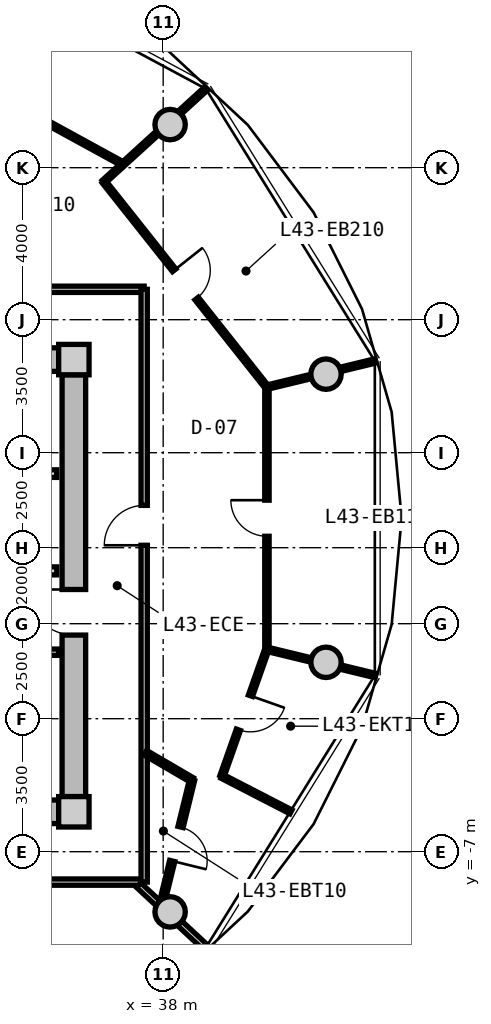
"""IFC4 building model, lengths in metres.
Left out: names, types, materials, properties, quantities, classifications, styles, units other than length and angle.
Written with IfcOpenShell. Run it as: python <this file> out.ifc"""

import sys

from ifc_helpers import new_model, si_unit, direction, frame, frame_2d, origin, origin_2d, place, context, subcontext, project, spatial, rectangle, circle, extrude, source, transform, mapped, element, fill, save


model = new_model("IFC4")
c1 = context("Model", 3, precision=1e-05, world=origin(), true_north=direction((0.0, 1.0)))
c2 = subcontext(c1, "Body", "Model", "MODEL_VIEW")
j1 = project(units=[si_unit("LENGTHUNIT", "METRE"), si_unit("PLANEANGLEUNIT", "RADIAN")], contexts=[c1])
p1 = place(None, origin())
s1 = spatial("IfcSite", under=j1, at=p1, CompositionType="ELEMENT")
p2 = place(p1, origin())
s2 = spatial("IfcBuilding", under=s1, at=p2, CompositionType="ELEMENT")
p3 = place(p2, frame((0.0, 0.0, 140.4)))
s3 = spatial("IfcBuildingStorey", under=s2, at=p3, CompositionType="ELEMENT", Elevation=140.4)
m1 = source(origin(), c2, "Body", "SweptSolid", [
    extrude(rectangle(XDim=0.8, YDim=0.8, at=origin_2d()), origin(), (0.0, 0.0, 1.0), 3.05),
])
for number, where, z_axis, x_axis in (
    (1, (35.65, -5.95, 0.0), (0.0, 0.0, 1.0), (1.0, 0.0, 0.0)),
    (2, (35.65, 5.95, 0.0), (0.0, 0.0, 1.0), (1.0, 0.0, 0.0)),
):
    element("IfcColumn", number, at=place(p3, frame(where, z_axis=z_axis, x_axis=x_axis)), inside=s3, PredefinedType="COLUMN", context=c2, shape_type="MappedRepresentation", body=[
        mapped(m1, transform((0.0, 0.0, 0.0), x_axis=(1.0, 0.0, 0.0), y_axis=(0.0, 1.0, 0.0), z_axis=(0.0, 0.0, 1.0), scale=1.0)),
    ])
m2 = source(origin(), c2, "Body", "SweptSolid", [
    extrude(rectangle(XDim=14.5, YDim=0.62, at=frame_2d((7.25, 0.0))), origin(), (0.0, 0.0, 1.0), 2.81),
])
for number, where, z_axis, x_axis in (
    (3, (20.75, 5.95, 0.0), (0.0, 0.0, 1.0), (1.0, 0.0, 0.0)),
    (4, (35.25, -5.95, 0.0), (0.0, 0.0, 1.0), (-1.0, 0.0, 0.0)),
):
    element("IfcWall", number, at=place(p3, frame(where, z_axis=z_axis, x_axis=x_axis)), inside=s3, PredefinedType="SHEAR", context=c2, shape_type="MappedRepresentation", body=[
        mapped(m2, transform((0.0, 0.0, 0.0), x_axis=(1.0, 0.0, 0.0), y_axis=(0.0, 1.0, 0.0), z_axis=(0.0, 0.0, 1.0), scale=1.0)),
    ])
m3 = source(origin(), c2, "Body", "SweptSolid", [
    extrude(rectangle(XDim=11.1, YDim=0.62, at=frame_2d((5.55, 0.0))), origin(), (0.0, 0.0, 1.0), 2.81),
])
p4 = place(p3, frame((35.65, 5.55, 0.0), z_axis=(0.0, 0.0, 1.0), x_axis=(0.0, -1.0, 0.0)))
e5 = element("IfcWall", 5, at=p4, inside=s3, PredefinedType="SHEAR", context=c2, shape_type="MappedRepresentation", body=[
    mapped(m3, transform((0.0, 0.0, 0.0), x_axis=(1.0, 0.0, 0.0), y_axis=(0.0, 1.0, 0.0), z_axis=(0.0, 0.0, 1.0), scale=1.0)),
])
p5 = place(p4, frame((5.65, 0.0, 0.0)))
e6 = element("IfcOpeningElement", 6, at=p5, cuts=e5, PredefinedType="OPENING", context=c2, shape_type="SweptSolid", body=[
    extrude(rectangle(XDim=1.2, YDim=2.15, at=frame_2d((0.6, 1.075))), frame((0.0, 0.32, 0.0), z_axis=(0.0, -1.0, 0.0), x_axis=(1.0, 0.0, 0.0)), (0.0, 0.0, 1.0), 0.64),
])
m4 = source(origin(), c2, "Body", "SweptSolid", [
    extrude(circle(Radius=0.4, at=origin_2d()), origin(), (0.0, 0.0, 1.0), 3.05),
])
for number, where, z_axis, x_axis in (
    (7, (42.285, 5.567, 0.0), (0.0, 0.0, 1.0), (1.0, 0.0, 0.0)),
    (8, (38.183, 12.135, 0.0), (0.0, 0.0, 1.0), (1.0, 0.0, 0.0)),
    (9, (38.183, -8.584, 0.0), (0.0, 0.0, 1.0), (1.0, 0.0, 0.0)),
    (10, (42.285, -2.016, 0.0), (0.0, 0.0, 1.0), (1.0, 0.0, 0.0)),
):
    element("IfcColumn", number, at=place(p3, frame(where, z_axis=z_axis, x_axis=x_axis)), inside=s3, PredefinedType="COLUMN", context=c2, shape_type="MappedRepresentation", body=[
        mapped(m4, transform((0.0, 0.0, 0.0), x_axis=(1.0, 0.0, 0.0), y_axis=(0.0, 1.0, 0.0), z_axis=(0.0, 0.0, 1.0), scale=1.0)),
    ])
m5 = source(origin(), c2, "Body", "SweptSolid", [
    extrude(rectangle(XDim=3.2, YDim=0.2, at=frame_2d((1.6, 0.0))), origin(), (0.0, 0.0, 1.0), 2.795),
])
p6 = place(p3, frame((32.0, 2.95, 0.0), z_axis=(0.0, 0.0, 1.0), x_axis=(1.0, 0.0, 0.0)))
e11 = element("IfcWall", 11, at=p6, inside=s3, PredefinedType="PARTITIONING", context=c2, shape_type="MappedRepresentation", body=[
    mapped(m5, transform((0.0, 0.0, 0.0), x_axis=(1.0, 0.0, 0.0), y_axis=(0.0, 1.0, 0.0), z_axis=(0.0, 0.0, 1.0), scale=1.0)),
])
m6 = source(origin(), c2, "Body", "SweptSolid", [
    extrude(rectangle(XDim=6.66, YDim=0.21, at=frame_2d((3.33, 0.0))), origin(), (0.0, 0.0, 1.0), 2.795),
])
p7 = place(p3, frame((28.54, 0.39, 0.0), z_axis=(0.0, 0.0, 1.0), x_axis=(1.0, 0.0, 0.0)))
e12 = element("IfcWall", 12, at=p7, inside=s3, PredefinedType="PARTITIONING", context=c2, shape_type="MappedRepresentation", body=[
    mapped(m6, transform((0.0, 0.0, 0.0), x_axis=(1.0, 0.0, 0.0), y_axis=(0.0, 1.0, 0.0), z_axis=(0.0, 0.0, 1.0), scale=1.0)),
])
p8 = place(p7, frame((1.0, 0.0, 0.0)))
e13 = element("IfcOpeningElement", 13, at=p8, cuts=e12, PredefinedType="OPENING", context=c2, shape_type="SweptSolid", body=[
    extrude(rectangle(XDim=1.2, YDim=2.15, at=frame_2d((0.6, 1.075))), frame((0.0, 0.115, 0.0), z_axis=(0.0, -1.0, 0.0), x_axis=(1.0, 0.0, 0.0)), (0.0, 0.0, 1.0), 0.23),
])
m7 = source(origin(), c2, "Body", "SweptSolid", [
    extrude(rectangle(XDim=2.7, YDim=0.165, at=frame_2d((1.35, 0.0))), origin(), (0.0, 0.0, 1.0), 2.795),
])
p9 = place(p3, frame((32.55, -1.75, 0.0), z_axis=(0.0, 0.0, 1.0), x_axis=(1.0, 0.0, 0.0)))
e14 = element("IfcWall", 14, at=p9, inside=s3, PredefinedType="PARTITIONING", context=c2, shape_type="MappedRepresentation", body=[
    mapped(m7, transform((0.0, 0.0, 0.0), x_axis=(1.0, 0.0, 0.0), y_axis=(0.0, 1.0, 0.0), z_axis=(0.0, 0.0, 1.0), scale=1.0)),
])
p10 = place(p9, frame((0.85, 0.0, 0.0)))
e15 = element("IfcOpeningElement", 15, at=p10, cuts=e14, PredefinedType="OPENING", context=c2, shape_type="SweptSolid", body=[
    extrude(rectangle(XDim=0.925, YDim=2.1, at=frame_2d((0.462, 1.05))), frame((0.0, 0.093, 0.0), z_axis=(0.0, -1.0, 0.0), x_axis=(1.0, 0.0, 0.0)), (0.0, 0.0, 1.0), 0.185),
])
m8 = source(origin(), c2, "Body", "SweptSolid", [
    extrude(rectangle(XDim=8.719, YDim=0.165, at=frame_2d((4.36, 0.0))), origin(), (0.0, 0.0, 1.0), 2.795),
])
p11 = place(p3, frame((28.781, 7.8, 0.0), z_axis=(0.0, 0.0, 1.0), x_axis=(1.0, 0.0, 0.0)))
e16 = element("IfcWall", 16, at=p11, inside=s3, PredefinedType="PARTITIONING", context=c2, shape_type="MappedRepresentation", body=[
    mapped(m8, transform((0.0, 0.0, 0.0), x_axis=(1.0, 0.0, 0.0), y_axis=(0.0, 1.0, 0.0), z_axis=(0.0, 0.0, 1.0), scale=1.0)),
])
m9 = source(origin(), c2, "Body", "SweptSolid", [
    extrude(rectangle(XDim=8.6, YDim=0.165, at=frame_2d((4.3, 0.0))), origin(), (0.0, 0.0, 1.0), 2.795),
])
p12 = place(p3, frame((37.5, -7.8, 0.0), z_axis=(0.0, 0.0, 1.0), x_axis=(-1.0, 0.0, 0.0)))
e17 = element("IfcWall", 17, at=p12, inside=s3, PredefinedType="PARTITIONING", context=c2, shape_type="MappedRepresentation", body=[
    mapped(m9, transform((0.0, 0.0, 0.0), x_axis=(1.0, 0.0, 0.0), y_axis=(0.0, 1.0, 0.0), z_axis=(0.0, 0.0, 1.0), scale=1.0)),
])
p13 = place(p12, frame((3.775, 0.0, 0.0)))
e18 = element("IfcOpeningElement", 18, at=p13, cuts=e17, PredefinedType="OPENING", context=c2, shape_type="SweptSolid", body=[
    extrude(rectangle(XDim=1.05, YDim=2.15, at=frame_2d((0.525, 1.075))), frame((0.0, 0.093, 0.0), z_axis=(0.0, -1.0, 0.0), x_axis=(1.0, 0.0, 0.0)), (0.0, 0.0, 1.0), 0.185),
])
m10 = source(origin(), c2, "Body", "SweptSolid", [
    extrude(rectangle(XDim=15.6, YDim=0.165, at=frame_2d((7.8, 0.0))), origin(), (0.0, 0.0, 1.0), 2.795),
])
p14 = place(p3, frame((37.5, 7.8, 0.0), z_axis=(0.0, 0.0, 1.0), x_axis=(0.0, -1.0, 0.0)))
e19 = element("IfcWall", 19, at=p14, inside=s3, PredefinedType="PARTITIONING", context=c2, shape_type="MappedRepresentation", body=[
    mapped(m10, transform((0.0, 0.0, 0.0), x_axis=(1.0, 0.0, 0.0), y_axis=(0.0, 1.0, 0.0), z_axis=(0.0, 0.0, 1.0), scale=1.0)),
])
p15 = place(p14, frame((5.687, 0.0, 0.0)))
e20 = element("IfcOpeningElement", 20, at=p15, cuts=e19, PredefinedType="OPENING", context=c2, shape_type="SweptSolid", body=[
    extrude(rectangle(XDim=1.05, YDim=2.15, at=frame_2d((0.525, 1.075))), frame((0.0, 0.093, 0.0), z_axis=(0.0, -1.0, 0.0), x_axis=(1.0, 0.0, 0.0)), (0.0, 0.0, 1.0), 0.185),
])
m11 = source(origin(), c2, "Body", "SweptSolid", [
    extrude(rectangle(XDim=2.435, YDim=0.165, at=frame_2d((1.217, 0.0))), origin(), (0.0, 0.0, 1.0), 2.345),
])
p16 = place(p3, frame((37.354, -7.88, 0.0), z_axis=(0.0, 0.0, 1.0), x_axis=(0.732164643118, -0.681127693878, 0.0)))
e21 = element("IfcWall", 21, at=p16, inside=s3, PredefinedType="PARTITIONING", context=c2, shape_type="MappedRepresentation", body=[
    mapped(m11, transform((0.0, 0.0, 0.0), x_axis=(1.0, 0.0, 0.0), y_axis=(0.0, 1.0, 0.0), z_axis=(0.0, 0.0, 1.0), scale=1.0)),
])
m12 = source(origin(), c2, "Body", "SweptSolid", [
    extrude(rectangle(XDim=6.897, YDim=0.115, at=frame_2d((3.448, 0.0))), origin(), (0.0, 0.0, 1.0), 2.795),
])
p17 = place(p3, frame((40.73, -1.673, 0.0), z_axis=(0.0, 0.0, 1.0), x_axis=(0.0, 1.0, 0.0)))
e22 = element("IfcWall", 22, at=p17, inside=s3, PredefinedType="PARTITIONING", context=c2, shape_type="MappedRepresentation", body=[
    mapped(m12, transform((0.0, 0.0, 0.0), x_axis=(1.0, 0.0, 0.0), y_axis=(0.0, 1.0, 0.0), z_axis=(0.0, 0.0, 1.0), scale=1.0)),
])
p18 = place(p17, frame((2.973, 0.0, 0.0)))
e23 = element("IfcOpeningElement", 23, at=p18, cuts=e22, PredefinedType="OPENING", context=c2, shape_type="SweptSolid", body=[
    extrude(rectangle(XDim=0.95, YDim=2.1, at=frame_2d((0.475, 1.05))), frame((0.0, 0.067, 0.0), z_axis=(0.0, -1.0, 0.0), x_axis=(1.0, 0.0, 0.0)), (0.0, 0.0, 1.0), 0.135),
])
m13 = source(origin(), c2, "Body", "SweptSolid", [
    extrude(rectangle(XDim=2.941, YDim=0.115, at=frame_2d((1.471, 0.0))), origin(), (0.0, 0.0, 1.0), 2.345),
])
p19 = place(p3, frame((40.73, -1.673, 0.0), z_axis=(0.0, 0.0, 1.0), x_axis=(0.971874866371, -0.235497864357, 0.0)))
e24 = element("IfcWall", 24, at=p19, inside=s3, PredefinedType="PARTITIONING", context=c2, shape_type="MappedRepresentation", body=[
    mapped(m13, transform((0.0, 0.0, 0.0), x_axis=(1.0, 0.0, 0.0), y_axis=(0.0, 1.0, 0.0), z_axis=(0.0, 0.0, 1.0), scale=1.0)),
])
m14 = source(origin(), c2, "Body", "SweptSolid", [
    extrude(rectangle(XDim=6.902, YDim=0.115, at=frame_2d((3.451, 0.0))), origin(), (0.0, 0.0, 1.0), 2.795),
])
p20 = place(p3, frame((40.729, 5.223, 0.0), z_axis=(0.0, 0.0, 1.0), x_axis=(-0.62123371778, 0.783625336429, 0.0)))
e25 = element("IfcWall", 25, at=p20, inside=s3, PredefinedType="PARTITIONING", context=c2, shape_type="MappedRepresentation", body=[
    mapped(m14, transform((0.0, 0.0, 0.0), x_axis=(1.0, 0.0, 0.0), y_axis=(0.0, 1.0, 0.0), z_axis=(0.0, 0.0, 1.0), scale=1.0)),
])
p21 = place(p20, frame((2.976, 0.0, 0.0)))
e26 = element("IfcOpeningElement", 26, at=p21, cuts=e25, PredefinedType="OPENING", context=c2, shape_type="SweptSolid", body=[
    extrude(rectangle(XDim=0.95, YDim=2.1, at=frame_2d((0.475, 1.05))), frame((0.0, 0.067, 0.0), z_axis=(0.0, -1.0, 0.0), x_axis=(1.0, 0.0, 0.0)), (0.0, 0.0, 1.0), 0.135),
])
m15 = source(origin(), c2, "Body", "SweptSolid", [
    extrude(rectangle(XDim=2.943, YDim=0.115, at=frame_2d((1.471, 0.0))), origin(), (0.0, 0.0, 1.0), 2.345),
])
p22 = place(p3, frame((40.729, 5.223, 0.0), z_axis=(0.0, 0.0, 1.0), x_axis=(0.971864495214, 0.235540660911, 0.0)))
e27 = element("IfcWall", 27, at=p22, inside=s3, PredefinedType="PARTITIONING", context=c2, shape_type="MappedRepresentation", body=[
    mapped(m15, transform((0.0, 0.0, 0.0), x_axis=(1.0, 0.0, 0.0), y_axis=(0.0, 1.0, 0.0), z_axis=(0.0, 0.0, 1.0), scale=1.0)),
])
m16 = source(origin(), c2, "Body", "SweptSolid", [
    extrude(rectangle(XDim=7.167, YDim=0.115, at=frame_2d((3.583, 0.0))), origin(), (0.0, 0.0, 1.0), 2.795),
])
p23 = place(p3, frame((36.939, 11.098, 0.0), z_axis=(0.0, 0.0, 1.0), x_axis=(-0.8771628907, 0.480192943699, 0.0)))
e28 = element("IfcWall", 28, at=p23, inside=s3, PredefinedType="PARTITIONING", context=c2, shape_type="MappedRepresentation", body=[
    mapped(m16, transform((0.0, 0.0, 0.0), x_axis=(1.0, 0.0, 0.0), y_axis=(0.0, 1.0, 0.0), z_axis=(0.0, 0.0, 1.0), scale=1.0)),
])
p24 = place(p23, frame((3.108, 0.0, 0.0)))
e29 = element("IfcOpeningElement", 29, at=p24, cuts=e28, PredefinedType="OPENING", context=c2, shape_type="SweptSolid", body=[
    extrude(rectangle(XDim=0.95, YDim=2.1, at=frame_2d((0.475, 1.05))), frame((0.0, 0.067, 0.0), z_axis=(0.0, -1.0, 0.0), x_axis=(1.0, 0.0, 0.0)), (0.0, 0.0, 1.0), 0.135),
])
m17 = source(origin(), c2, "Body", "SweptSolid", [
    extrude(rectangle(XDim=3.66, YDim=0.115, at=frame_2d((1.83, 0.0))), origin(), (0.0, 0.0, 1.0), 2.345),
])
p25 = place(p3, frame((36.432, 10.624, 0.0), z_axis=(0.0, 0.0, 1.0), x_axis=(0.73909744987, 0.673598515137, 0.0)))
e30 = element("IfcWall", 30, at=p25, inside=s3, PredefinedType="PARTITIONING", context=c2, shape_type="MappedRepresentation", body=[
    mapped(m17, transform((0.0, 0.0, 0.0), x_axis=(1.0, 0.0, 0.0), y_axis=(0.0, 1.0, 0.0), z_axis=(0.0, 0.0, 1.0), scale=1.0)),
])
m18 = source(origin(), c2, "Body", "SweptSolid", [
    extrude(rectangle(XDim=1.425, YDim=0.14, at=frame_2d((0.712, 0.0))), origin(), (0.0, 0.0, 1.0), 2.795),
])
p26 = place(p3, frame((37.53, -4.396, 0.0), z_axis=(0.0, 0.0, 1.0), x_axis=(0.86324395577, -0.50478695786, 0.0)))
e31 = element("IfcWall", 31, at=p26, inside=s3, PredefinedType="PARTITIONING", context=c2, shape_type="MappedRepresentation", body=[
    mapped(m18, transform((0.0, 0.0, 0.0), x_axis=(1.0, 0.0, 0.0), y_axis=(0.0, 1.0, 0.0), z_axis=(0.0, 0.0, 1.0), scale=1.0)),
])
m19 = source(origin(), c2, "Body", "SweptSolid", [
    extrude(rectangle(XDim=3.464, YDim=0.14, at=frame_2d((1.732, 0.0))), origin(), (0.0, 0.0, 1.0), 2.795),
])
p27 = place(p3, frame((38.76, -5.115, 0.0), z_axis=(0.0, 0.0, 1.0), x_axis=(-0.238055968485, -0.971251438027, 0.0)))
e32 = element("IfcWall", 32, at=p27, inside=s3, PredefinedType="PARTITIONING", context=c2, shape_type="MappedRepresentation", body=[
    mapped(m19, transform((0.0, 0.0, 0.0), x_axis=(1.0, 0.0, 0.0), y_axis=(0.0, 1.0, 0.0), z_axis=(0.0, 0.0, 1.0), scale=1.0)),
])
p28 = place(p27, frame((1.272, 0.0, 0.0)))
e33 = element("IfcOpeningElement", 33, at=p28, cuts=e32, PredefinedType="OPENING", context=c2, shape_type="SweptSolid", body=[
    extrude(rectangle(XDim=0.92, YDim=2.1, at=frame_2d((0.46, 1.05))), frame((0.0, 0.08, 0.0), z_axis=(0.0, -1.0, 0.0), x_axis=(1.0, 0.0, 0.0)), (0.0, 0.0, 1.0), 0.16),
])
m20 = source(origin(), c2, "Body", "SweptSolid", [
    extrude(rectangle(XDim=2.043, YDim=0.115, at=frame_2d((1.022, 0.0))), origin(), (0.0, 0.0, 1.0), 2.795),
])
p29 = place(p3, frame((39.547, -5.016, 0.0), z_axis=(0.0, 0.0, 1.0), x_axis=(0.888790240023, -0.45831420362, 0.0)))
e34 = element("IfcWall", 34, at=p29, inside=s3, PredefinedType="PARTITIONING", context=c2, shape_type="MappedRepresentation", body=[
    mapped(m20, transform((0.0, 0.0, 0.0), x_axis=(1.0, 0.0, 0.0), y_axis=(0.0, 1.0, 0.0), z_axis=(0.0, 0.0, 1.0), scale=1.0)),
])
m21 = source(origin(), c2, "Body", "SweptSolid", [
    extrude(rectangle(XDim=3.546, YDim=0.115, at=frame_2d((1.773, 0.0))), origin(), (0.0, 0.0, 1.0), 2.795),
])
p30 = place(p3, frame((39.547, -5.016, 0.0), z_axis=(0.0, 0.0, 1.0), x_axis=(0.333403534043, 0.942784218943, 0.0)))
e35 = element("IfcWall", 35, at=p30, inside=s3, PredefinedType="PARTITIONING", context=c2, shape_type="MappedRepresentation", body=[
    mapped(m21, transform((0.0, 0.0, 0.0), x_axis=(1.0, 0.0, 0.0), y_axis=(0.0, 1.0, 0.0), z_axis=(0.0, 0.0, 1.0), scale=1.0)),
])
p31 = place(p30, frame((1.298, 0.0, 0.0)))
e36 = element("IfcOpeningElement", 36, at=p31, cuts=e35, PredefinedType="OPENING", context=c2, shape_type="SweptSolid", body=[
    extrude(rectangle(XDim=0.95, YDim=2.1, at=frame_2d((0.475, 1.05))), frame((0.0, 0.067, 0.0), z_axis=(0.0, -1.0, 0.0), x_axis=(1.0, 0.0, 0.0)), (0.0, 0.0, 1.0), 0.135),
])
m22 = source(origin(), c2, "Body", "SweptSolid", [
    extrude(rectangle(XDim=1.2, YDim=2.15, at=frame_2d((0.6, 1.075))), frame((0.0, 0.025, 0.0), z_axis=(0.0, -1.0, 0.0), x_axis=(1.0, 0.0, 0.0)), (0.0, 0.0, 1.0), 0.05),
])
p32 = place(p5, frame((1.2, 0.0, 0.0), z_axis=(0.0, 0.0, 1.0), x_axis=(-1.0, 0.0, 0.0)))
e37 = element("IfcDoor", 37, at=p32, inside=s3, OperationType="SINGLE_SWING_RIGHT", PredefinedType="DOOR", context=c2, shape_type="MappedRepresentation", body=[
    mapped(m22, transform((0.0, 0.0, 0.0), x_axis=(1.0, 0.0, 0.0), y_axis=(0.0, 1.0, 0.0), z_axis=(0.0, 0.0, 1.0), scale=1.0)),
])
fill(e6, e37)
m23 = source(origin(), c2, "Body", "SweptSolid", [
    extrude(rectangle(XDim=1.05, YDim=2.15, at=frame_2d((0.525, 1.075))), frame((0.0, 0.025, 0.0), z_axis=(0.0, -1.0, 0.0), x_axis=(1.0, 0.0, 0.0)), (0.0, 0.0, 1.0), 0.05),
])
p33 = place(p15, frame((1.05, 0.0, 0.0), z_axis=(0.0, 0.0, 1.0), x_axis=(-1.0, 0.0, 0.0)))
e38 = element("IfcDoor", 38, at=p33, inside=s3, OperationType="SINGLE_SWING_LEFT", PredefinedType="DOOR", context=c2, shape_type="MappedRepresentation", body=[
    mapped(m23, transform((0.0, 0.0, 0.0), x_axis=(1.0, 0.0, 0.0), y_axis=(0.0, 1.0, 0.0), z_axis=(0.0, 0.0, 1.0), scale=1.0)),
])
fill(e20, e38)
m24 = source(origin(), c2, "Body", "SweptSolid", [
    extrude(rectangle(XDim=0.92, YDim=2.1, at=frame_2d((0.46, 1.05))), frame((0.0, 0.025, 0.0), z_axis=(0.0, -1.0, 0.0), x_axis=(1.0, 0.0, 0.0)), (0.0, 0.0, 1.0), 0.05),
])
p34 = place(p28, origin())
e39 = element("IfcDoor", 39, at=p34, inside=s3, OperationType="SINGLE_SWING_RIGHT", PredefinedType="DOOR", context=c2, shape_type="MappedRepresentation", body=[
    mapped(m24, transform((0.0, 0.0, 0.0), x_axis=(1.0, 0.0, 0.0), y_axis=(0.0, 1.0, 0.0), z_axis=(0.0, 0.0, 1.0), scale=1.0)),
])
fill(e33, e39)
m25 = source(origin(), c2, "Body", "SweptSolid", [
    extrude(rectangle(XDim=0.95, YDim=2.1, at=frame_2d((0.475, 1.05))), frame((0.0, 0.025, 0.0), z_axis=(0.0, -1.0, 0.0), x_axis=(1.0, 0.0, 0.0)), (0.0, 0.0, 1.0), 0.05),
])
p35 = place(p31, frame((0.95, 0.0, 0.0), z_axis=(0.0, 0.0, 1.0), x_axis=(-1.0, 0.0, 0.0)))
e40 = element("IfcDoor", 40, at=p35, inside=s3, OperationType="SINGLE_SWING_LEFT", PredefinedType="DOOR", context=c2, shape_type="MappedRepresentation", body=[
    mapped(m25, transform((0.0, 0.0, 0.0), x_axis=(1.0, 0.0, 0.0), y_axis=(0.0, 1.0, 0.0), z_axis=(0.0, 0.0, 1.0), scale=1.0)),
])
fill(e36, e40)
p36 = place(p18, origin())
e41 = element("IfcDoor", 41, at=p36, inside=s3, OperationType="SINGLE_SWING_RIGHT", PredefinedType="DOOR", context=c2, shape_type="MappedRepresentation", body=[
    mapped(m25, transform((0.0, 0.0, 0.0), x_axis=(1.0, 0.0, 0.0), y_axis=(0.0, 1.0, 0.0), z_axis=(0.0, 0.0, 1.0), scale=1.0)),
])
fill(e23, e41)
p37 = place(p21, frame((0.95, 0.0, 0.0), z_axis=(0.0, 0.0, 1.0), x_axis=(-1.0, 0.0, 0.0)))
e42 = element("IfcDoor", 42, at=p37, inside=s3, OperationType="SINGLE_SWING_LEFT", PredefinedType="DOOR", context=c2, shape_type="MappedRepresentation", body=[
    mapped(m25, transform((0.0, 0.0, 0.0), x_axis=(1.0, 0.0, 0.0), y_axis=(0.0, 1.0, 0.0), z_axis=(0.0, 0.0, 1.0), scale=1.0)),
])
fill(e26, e42)
save(model, sys.argv[1])
